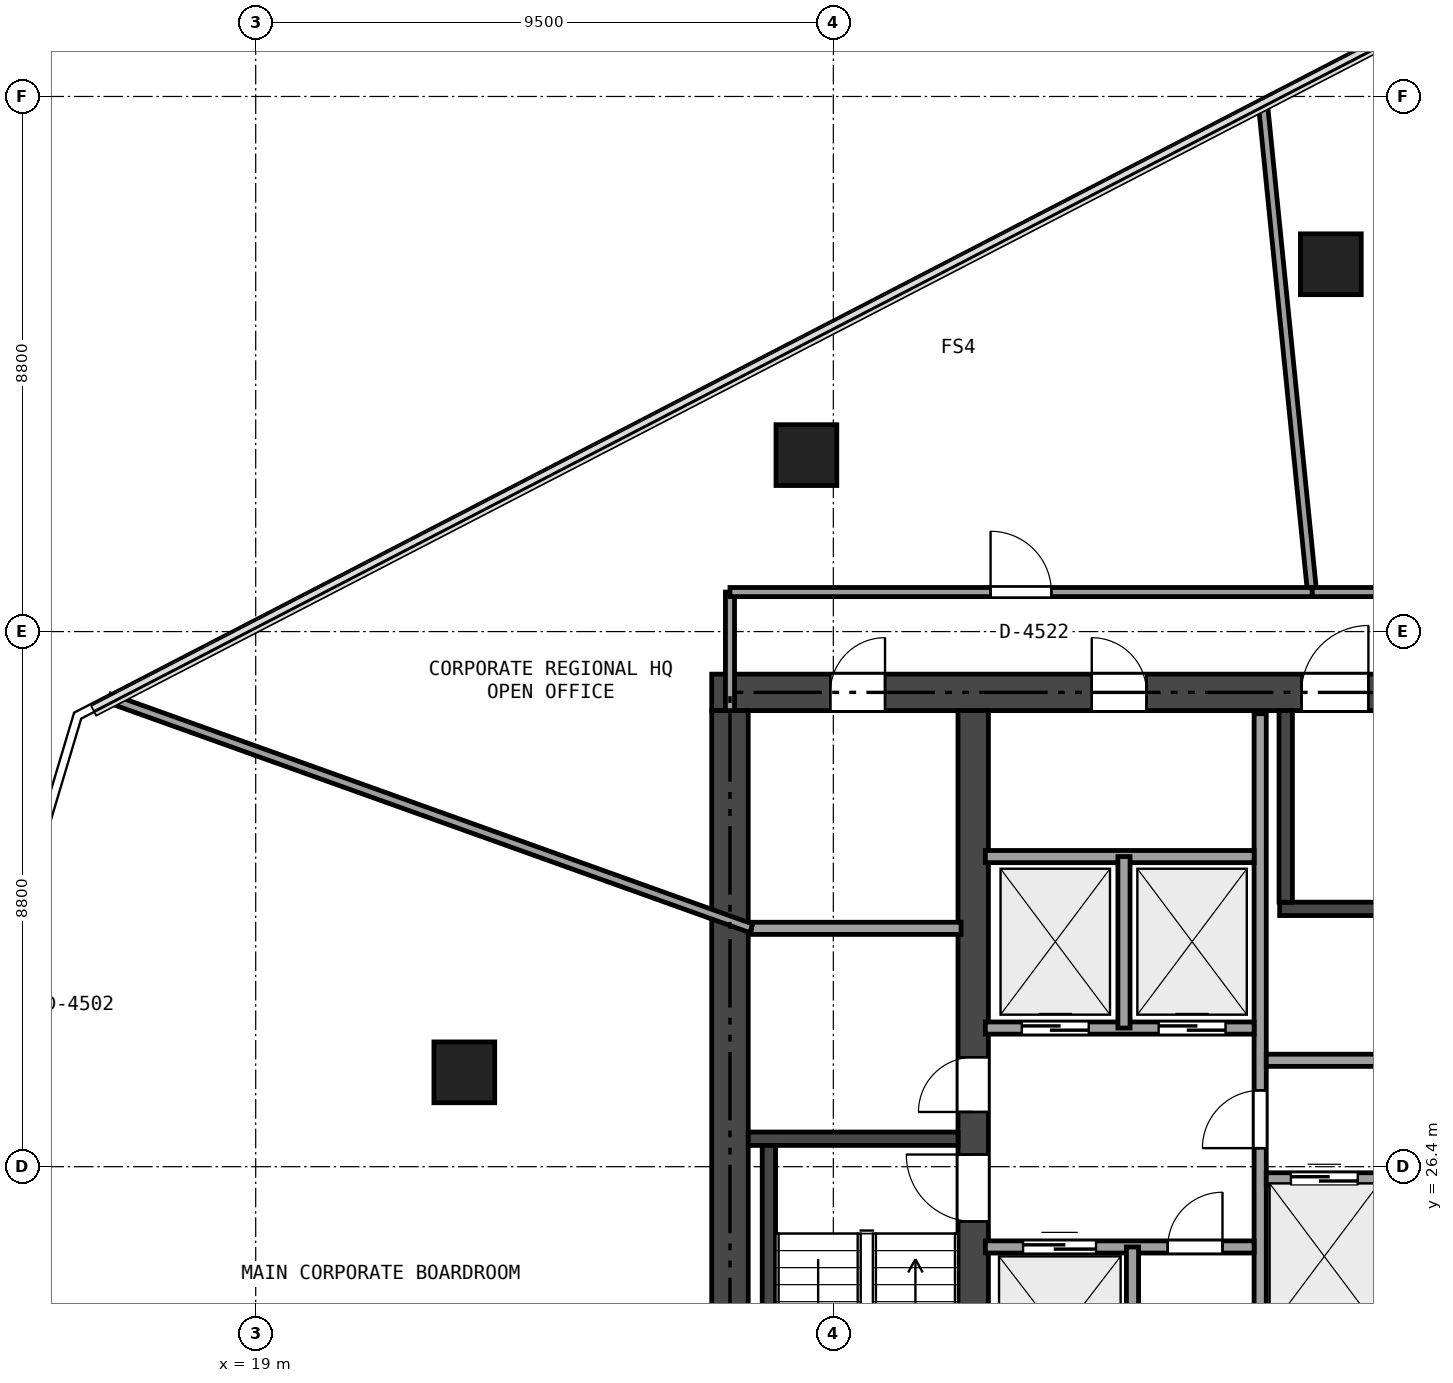
"""IFC4 building model, lengths in metres.
Left out: names, types, materials, properties, quantities, classifications, styles, units other than length and angle.
Written with IfcOpenShell. Run it as: python <this file> out.ifc"""

import sys

from ifc_helpers import new_model, si_unit, direction, frame, frame_2d, origin, origin_2d, place, context, subcontext, project, spatial, rectangle, extrude, element, fill, save


model = new_model("IFC4")
c1 = context("Model", 3, precision=1e-05, world=origin(), true_north=direction((0.0, 1.0)))
c2 = subcontext(c1, "Body", "Model", "MODEL_VIEW")
j1 = project(units=[si_unit("LENGTHUNIT", "METRE"), si_unit("PLANEANGLEUNIT", "RADIAN")], contexts=[c1])
p1 = place(None, origin())
s1 = spatial("IfcSite", under=j1, at=p1, CompositionType="ELEMENT")
p2 = place(p1, origin())
s2 = spatial("IfcBuilding", under=s1, at=p2, CompositionType="ELEMENT")
p3 = place(p2, frame((0.0, 0.0, 168.9)))
s3 = spatial("IfcBuildingStorey", under=s2, at=p3, CompositionType="ELEMENT", Elevation=168.9)
p4 = place(p3, frame((26.5, 34.2, 0.0), z_axis=(0.0, 0.0, 1.0), x_axis=(1.0, 0.0, 0.0)))
e1 = element("IfcWall", 1, at=p4, inside=s3, PredefinedType="SHEAR", context=c2, shape_type="SweptSolid", body=[
    extrude(rectangle(XDim=21.4, YDim=0.6, at=frame_2d((10.7, 0.0))), origin(), (0.0, 0.0, 1.0), 3.24),
])
p5 = place(p4, frame((9.7, 0.0, 0.0)))
e2 = element("IfcOpeningElement", 2, at=p5, cuts=e1, PredefinedType="OPENING", context=c2, shape_type="SweptSolid", body=[
    extrude(rectangle(XDim=1.1, YDim=2.15, at=frame_2d((0.55, 1.075))), frame((0.0, 0.31, 0.0), z_axis=(0.0, -1.0, 0.0), x_axis=(1.0, 0.0, 0.0)), (0.0, 0.0, 1.0), 0.62),
])
p6 = place(p4, frame((1.95, 0.0, 0.0)))
e3 = element("IfcOpeningElement", 3, at=p6, cuts=e1, PredefinedType="OPENING", context=c2, shape_type="SweptSolid", body=[
    extrude(rectangle(XDim=0.9, YDim=2.1, at=frame_2d((0.45, 1.05))), frame((0.0, 0.31, 0.0), z_axis=(0.0, -1.0, 0.0), x_axis=(1.0, 0.0, 0.0)), (0.0, 0.0, 1.0), 0.62),
])
p7 = place(p4, frame((6.25, 0.0, 0.0)))
e4 = element("IfcOpeningElement", 4, at=p7, cuts=e1, PredefinedType="OPENING", context=c2, shape_type="SweptSolid", body=[
    extrude(rectangle(XDim=0.9, YDim=2.1, at=frame_2d((0.45, 1.05))), frame((0.0, 0.31, 0.0), z_axis=(0.0, -1.0, 0.0), x_axis=(1.0, 0.0, 0.0)), (0.0, 0.0, 1.0), 0.62),
])
p8 = place(p3, frame((26.8, 18.9, 0.0), z_axis=(0.0, 0.0, 1.0), x_axis=(0.0, 1.0, 0.0)))
e5 = element("IfcWall", 5, at=p8, inside=s3, PredefinedType="SHEAR", context=c2, shape_type="SweptSolid", body=[
    extrude(rectangle(XDim=15.0, YDim=0.6, at=frame_2d((7.5, 0.0))), origin(), (0.0, 0.0, 1.0), 3.24),
])
p9 = place(p3, frame((30.8, 18.9, 0.0), z_axis=(0.0, 0.0, 1.0), x_axis=(0.0, 1.0, 0.0)))
e6 = element("IfcWall", 6, at=p9, inside=s3, PredefinedType="SHEAR", context=c2, shape_type="SweptSolid", body=[
    extrude(rectangle(XDim=15.0, YDim=0.5, at=frame_2d((7.5, 0.0))), origin(), (0.0, 0.0, 1.0), 3.24),
])
p10 = place(p9, frame((6.6, 0.0, 0.0)))
e7 = element("IfcOpeningElement", 7, at=p10, cuts=e6, PredefinedType="OPENING", context=c2, shape_type="SweptSolid", body=[
    extrude(rectangle(XDim=1.1, YDim=2.15, at=frame_2d((0.55, 1.075))), frame((0.0, 0.26, 0.0), z_axis=(0.0, -1.0, 0.0), x_axis=(1.0, 0.0, 0.0)), (0.0, 0.0, 1.0), 0.52),
])
p11 = place(p9, frame((8.4, 0.0, 0.0)))
e8 = element("IfcOpeningElement", 8, at=p11, cuts=e6, PredefinedType="OPENING", context=c2, shape_type="SweptSolid", body=[
    extrude(rectangle(XDim=0.9, YDim=2.1, at=frame_2d((0.45, 1.05))), frame((0.0, 0.26, 0.0), z_axis=(0.0, -1.0, 0.0), x_axis=(1.0, 0.0, 0.0)), (0.0, 0.0, 1.0), 0.52),
])
p12 = place(p3, frame((27.1, 26.86, 0.0), z_axis=(0.0, 0.0, 1.0), x_axis=(1.0, 0.0, 0.0)))
e9 = element("IfcWall", 9, at=p12, inside=s3, PredefinedType="SHEAR", context=c2, shape_type="SweptSolid", body=[
    extrude(rectangle(XDim=3.45, YDim=0.22, at=frame_2d((1.725, 0.0))), origin(), (0.0, 0.0, 1.0), 3.24),
])
p13 = place(p3, frame((27.44, 19.35, 0.0), z_axis=(0.0, 0.0, 1.0), x_axis=(0.0, 1.0, 0.0)))
e10 = element("IfcWall", 10, at=p13, inside=s3, PredefinedType="SHEAR", context=c2, shape_type="SweptSolid", body=[
    extrude(rectangle(XDim=7.4, YDim=0.22, at=frame_2d((3.7, 0.0))), origin(), (0.0, 0.0, 1.0), 3.24),
])
p14 = place(p3, frame((35.84, 30.64, 0.0), z_axis=(0.0, 0.0, 1.0), x_axis=(1.0, 0.0, 0.0)))
e11 = element("IfcWall", 11, at=p14, inside=s3, PredefinedType="SHEAR", context=c2, shape_type="SweptSolid", body=[
    extrude(rectangle(XDim=7.61, YDim=0.22, at=frame_2d((3.805, 0.0))), origin(), (0.0, 0.0, 1.0), 3.24),
])
p15 = place(p3, frame((35.94, 30.75, 0.0), z_axis=(0.0, 0.0, 1.0), x_axis=(0.0, 1.0, 0.0)))
e12 = element("IfcWall", 12, at=p15, inside=s3, PredefinedType="SHEAR", context=c2, shape_type="SweptSolid", body=[
    extrude(rectangle(XDim=3.15, YDim=0.22, at=frame_2d((1.575, 0.0))), origin(), (0.0, 0.0, 1.0), 3.24),
])
for number, where, z_axis, x_axis in (
    (13, (36.682, 41.241, 0.0), (0.0, 0.0, 1.0), (1.0, 0.0, 0.0)),
    (14, (28.057, 38.102, 0.0), (0.0, 0.0, 1.0), (1.0, 0.0, 0.0)),
    (15, (22.431, 27.952, 0.0), (0.0, 0.0, 1.0), (1.0, 0.0, 0.0)),
):
    element("IfcColumn", number, at=place(p3, frame(where, z_axis=z_axis, x_axis=x_axis)), inside=s3, PredefinedType="COLUMN", context=c2, shape_type="SweptSolid", body=[
        extrude(rectangle(XDim=1.0, YDim=1.0, at=origin_2d()), origin(), (0.0, 0.0, 1.0), 3.24),
    ])
p16 = place(p3, frame((27.15, 30.32, 0.0), z_axis=(0.0, 0.0, 1.0), x_axis=(1.0, 0.0, 0.0)))
e16 = element("IfcWall", 16, at=p16, inside=s3, PredefinedType="SOLIDWALL", context=c2, shape_type="SweptSolid", body=[
    extrude(rectangle(XDim=3.45, YDim=0.2, at=frame_2d((1.725, 0.0))), origin(), (0.0, 0.0, 1.0), 3.24),
])
p17 = place(p3, frame((35.52, 18.95, 0.0), z_axis=(0.0, 0.0, 1.0), x_axis=(0.0, 1.0, 0.0)))
e17 = element("IfcWall", 17, at=p17, inside=s3, PredefinedType="SOLIDWALL", context=c2, shape_type="SweptSolid", body=[
    extrude(rectangle(XDim=14.9, YDim=0.2, at=frame_2d((7.45, 0.0))), origin(), (0.0, 0.0, 1.0), 2.761),
])
p18 = place(p17, frame((7.755, 0.0, 0.0)))
e18 = element("IfcOpeningElement", 18, at=p18, cuts=e17, PredefinedType="OPENING", context=c2, shape_type="SweptSolid", body=[
    extrude(rectangle(XDim=0.95, YDim=2.15, at=frame_2d((0.475, 1.075))), frame((0.0, 0.11, 0.0), z_axis=(0.0, -1.0, 0.0), x_axis=(1.0, 0.0, 0.0)), (0.0, 0.0, 1.0), 0.22),
])
p19 = place(p17, frame((0.6, 0.0, 0.0)))
e19 = element("IfcOpeningElement", 19, at=p19, cuts=e17, PredefinedType="OPENING", context=c2, shape_type="SweptSolid", body=[
    extrude(rectangle(XDim=0.9, YDim=2.1, at=frame_2d((0.45, 1.05))), frame((0.0, 0.11, 0.0), z_axis=(0.0, -1.0, 0.0), x_axis=(1.0, 0.0, 0.0)), (0.0, 0.0, 1.0), 0.22),
])
p20 = place(p3, frame((31.0, 28.68, 0.0), z_axis=(0.0, 0.0, 1.0), x_axis=(1.0, 0.0, 0.0)))
e20 = element("IfcWall", 20, at=p20, inside=s3, PredefinedType="SOLIDWALL", context=c2, shape_type="SweptSolid", body=[
    extrude(rectangle(XDim=4.42, YDim=0.2, at=frame_2d((2.21, 0.0))), origin(), (0.0, 0.0, 1.0), 3.24),
])
p21 = place(p20, frame((0.6, 0.0, 0.0)))
e21 = element("IfcOpeningElement", 21, at=p21, cuts=e20, PredefinedType="OPENING", context=c2, shape_type="SweptSolid", body=[
    extrude(rectangle(XDim=1.1, YDim=2.15, at=frame_2d((0.55, 1.075))), frame((0.0, 0.11, 0.0), z_axis=(0.0, -1.0, 0.0), x_axis=(1.0, 0.0, 0.0)), (0.0, 0.0, 1.0), 0.22),
])
p22 = place(p20, frame((2.85, 0.0, 0.0)))
e22 = element("IfcOpeningElement", 22, at=p22, cuts=e20, PredefinedType="OPENING", context=c2, shape_type="SweptSolid", body=[
    extrude(rectangle(XDim=1.1, YDim=2.15, at=frame_2d((0.55, 1.075))), frame((0.0, 0.11, 0.0), z_axis=(0.0, -1.0, 0.0), x_axis=(1.0, 0.0, 0.0)), (0.0, 0.0, 1.0), 0.22),
])
p23 = place(p3, frame((31.0, 31.5, 0.0), z_axis=(0.0, 0.0, 1.0), x_axis=(1.0, 0.0, 0.0)))
e23 = element("IfcWall", 23, at=p23, inside=s3, PredefinedType="SOLIDWALL", context=c2, shape_type="SweptSolid", body=[
    extrude(rectangle(XDim=4.42, YDim=0.2, at=frame_2d((2.21, 0.0))), origin(), (0.0, 0.0, 1.0), 3.24),
])
p24 = place(p3, frame((33.28, 28.68, 0.0), z_axis=(0.0, 0.0, 1.0), x_axis=(0.0, 1.0, 0.0)))
e24 = element("IfcWall", 24, at=p24, inside=s3, PredefinedType="SOLIDWALL", context=c2, shape_type="SweptSolid", body=[
    extrude(rectangle(XDim=2.82, YDim=0.2, at=frame_2d((1.41, 0.0))), origin(), (0.0, 0.0, 1.0), 3.24),
])
p25 = place(p3, frame((31.0, 25.08, 0.0), z_axis=(0.0, 0.0, 1.0), x_axis=(1.0, 0.0, 0.0)))
e25 = element("IfcWall", 25, at=p25, inside=s3, PredefinedType="SOLIDWALL", context=c2, shape_type="SweptSolid", body=[
    extrude(rectangle(XDim=4.42, YDim=0.2, at=frame_2d((2.21, 0.0))), origin(), (0.0, 0.0, 1.0), 3.24),
])
p26 = place(p25, frame((3.0, 0.0, 0.0)))
e26 = element("IfcOpeningElement", 26, at=p26, cuts=e25, PredefinedType="OPENING", context=c2, shape_type="SweptSolid", body=[
    extrude(rectangle(XDim=0.9, YDim=2.1, at=frame_2d((0.45, 1.05))), frame((0.0, 0.11, 0.0), z_axis=(0.0, -1.0, 0.0), x_axis=(1.0, 0.0, 0.0)), (0.0, 0.0, 1.0), 0.22),
])
p27 = place(p25, frame((0.62, 0.0, 0.0)))
e27 = element("IfcOpeningElement", 27, at=p27, cuts=e25, PredefinedType="OPENING", context=c2, shape_type="SweptSolid", body=[
    extrude(rectangle(XDim=1.2, YDim=2.15, at=frame_2d((0.6, 1.075))), frame((0.0, 0.11, 0.0), z_axis=(0.0, -1.0, 0.0), x_axis=(1.0, 0.0, 0.0)), (0.0, 0.0, 1.0), 0.22),
])
p28 = place(p3, frame((33.42, 18.95, 0.0), z_axis=(0.0, 0.0, 1.0), x_axis=(0.0, 1.0, 0.0)))
e28 = element("IfcWall", 28, at=p28, inside=s3, PredefinedType="SOLIDWALL", context=c2, shape_type="SweptSolid", body=[
    extrude(rectangle(XDim=6.13, YDim=0.2, at=frame_2d((3.065, 0.0))), origin(), (0.0, 0.0, 1.0), 2.761),
])
p29 = place(p3, frame((35.62, 28.15, 0.0), z_axis=(0.0, 0.0, 1.0), x_axis=(1.0, 0.0, 0.0)))
e29 = element("IfcWall", 29, at=p29, inside=s3, PredefinedType="SOLIDWALL", context=c2, shape_type="SweptSolid", body=[
    extrude(rectangle(XDim=7.88, YDim=0.2, at=frame_2d((3.94, 0.0))), origin(), (0.0, 0.0, 1.0), 3.24),
])
p30 = place(p3, frame((35.62, 26.2, 0.0), z_axis=(0.0, 0.0, 1.0), x_axis=(1.0, 0.0, 0.0)))
e30 = element("IfcWall", 30, at=p30, inside=s3, PredefinedType="SOLIDWALL", context=c2, shape_type="SweptSolid", body=[
    extrude(rectangle(XDim=7.88, YDim=0.2, at=frame_2d((3.94, 0.0))), origin(), (0.0, 0.0, 1.0), 3.24),
])
p31 = place(p30, frame((0.405, 0.0, 0.0)))
e31 = element("IfcOpeningElement", 31, at=p31, cuts=e30, PredefinedType="OPENING", context=c2, shape_type="SweptSolid", body=[
    extrude(rectangle(XDim=1.1, YDim=2.15, at=frame_2d((0.55, 1.075))), frame((0.0, 0.11, 0.0), z_axis=(0.0, -1.0, 0.0), x_axis=(1.0, 0.0, 0.0)), (0.0, 0.0, 1.0), 0.22),
])
p32 = place(p30, frame((2.355, 0.0, 0.0)))
e32 = element("IfcOpeningElement", 32, at=p32, cuts=e30, PredefinedType="OPENING", context=c2, shape_type="SweptSolid", body=[
    extrude(rectangle(XDim=1.1, YDim=2.15, at=frame_2d((0.55, 1.075))), frame((0.0, 0.11, 0.0), z_axis=(0.0, -1.0, 0.0), x_axis=(1.0, 0.0, 0.0)), (0.0, 0.0, 1.0), 0.22),
])
p33 = place(p30, frame((4.305, 0.0, 0.0)))
e33 = element("IfcOpeningElement", 33, at=p33, cuts=e30, PredefinedType="OPENING", context=c2, shape_type="SweptSolid", body=[
    extrude(rectangle(XDim=1.1, YDim=2.15, at=frame_2d((0.55, 1.075))), frame((0.0, 0.11, 0.0), z_axis=(0.0, -1.0, 0.0), x_axis=(1.0, 0.0, 0.0)), (0.0, 0.0, 1.0), 0.22),
])
p34 = place(p30, frame((6.255, 0.0, 0.0)))
e34 = element("IfcOpeningElement", 34, at=p34, cuts=e30, PredefinedType="OPENING", context=c2, shape_type="SweptSolid", body=[
    extrude(rectangle(XDim=1.1, YDim=2.15, at=frame_2d((0.55, 1.075))), frame((0.0, 0.11, 0.0), z_axis=(0.0, -1.0, 0.0), x_axis=(1.0, 0.0, 0.0)), (0.0, 0.0, 1.0), 0.22),
])
p35 = place(p3, frame((35.563, 43.898, 0.0), z_axis=(0.0, 0.0, 1.0), x_axis=(0.100149208892, -0.994972429748, 0.0)))
e35 = element("IfcWall", 35, at=p35, inside=s3, PredefinedType="PARTITIONING", context=c2, shape_type="SweptSolid", body=[
    extrude(rectangle(XDim=8.089, YDim=0.15, at=frame_2d((4.044, 0.0))), origin(), (0.0, 0.0, 1.0), 2.725),
])
p36 = place(p3, frame((36.373, 35.85, 0.0), z_axis=(0.0, 0.0, 1.0), x_axis=(1.0, 0.0, 0.0)))
e36 = element("IfcWall", 36, at=p36, inside=s3, PredefinedType="PARTITIONING", context=c2, shape_type="SweptSolid", body=[
    extrude(rectangle(XDim=1.757, YDim=0.15, at=frame_2d((0.878, 0.0))), origin(), (0.0, 0.0, 1.0), 2.607),
])
p37 = place(p3, frame((16.595, 34.101, 0.0), z_axis=(0.0, 0.0, 1.0), x_axis=(0.941419775025, -0.337237019309, 0.0)))
e37 = element("IfcWall", 37, at=p37, inside=s3, PredefinedType="PARTITIONING", context=c2, shape_type="SweptSolid", body=[
    extrude(rectangle(XDim=11.212, YDim=0.15, at=frame_2d((5.606, 0.0))), origin(), (0.0, 0.0, 1.0), 2.725),
])
p38 = place(p3, frame((26.8, 33.9, 0.0), z_axis=(0.0, 0.0, 1.0), x_axis=(0.0, 1.0, 0.0)))
e38 = element("IfcWall", 38, at=p38, inside=s3, PredefinedType="PARTITIONING", context=c2, shape_type="SweptSolid", body=[
    extrude(rectangle(XDim=1.95, YDim=0.15, at=frame_2d((0.975, 0.0))), origin(), (0.0, 0.0, 1.0), 2.725),
])
p39 = place(p3, frame((26.8, 35.85, 0.0), z_axis=(0.0, 0.0, 1.0), x_axis=(1.0, 0.0, 0.0)))
e39 = element("IfcWall", 39, at=p39, inside=s3, PredefinedType="PARTITIONING", context=c2, shape_type="SweptSolid", body=[
    extrude(rectangle(XDim=9.573, YDim=0.15, at=frame_2d((4.787, 0.0))), origin(), (0.0, 0.0, 1.0), 2.607),
])
p40 = place(p39, frame((4.286, 0.0, 0.0)))
e40 = element("IfcOpeningElement", 40, at=p40, cuts=e39, PredefinedType="OPENING", context=c2, shape_type="SweptSolid", body=[
    extrude(rectangle(XDim=1.0, YDim=2.15, at=frame_2d((0.5, 1.075))), frame((0.0, 0.085, 0.0), z_axis=(0.0, -1.0, 0.0), x_axis=(1.0, 0.0, 0.0)), (0.0, 0.0, 1.0), 0.17),
])
p41 = place(p10, origin())
e41 = element("IfcDoor", 41, at=p41, inside=s3, OperationType="SINGLE_SWING_RIGHT", PredefinedType="DOOR", context=c2, shape_type="SweptSolid", body=[
    extrude(rectangle(XDim=1.1, YDim=2.15, at=frame_2d((0.55, 1.075))), frame((0.0, 0.025, 0.0), z_axis=(0.0, -1.0, 0.0), x_axis=(1.0, 0.0, 0.0)), (0.0, 0.0, 1.0), 0.05),
])
fill(e7, e41)
p42 = place(p5, origin())
e42 = element("IfcDoor", 42, at=p42, inside=s3, OperationType="SINGLE_SWING_RIGHT", PredefinedType="DOOR", context=c2, shape_type="SweptSolid", body=[
    extrude(rectangle(XDim=1.1, YDim=2.15, at=frame_2d((0.55, 1.075))), frame((0.0, 0.025, 0.0), z_axis=(0.0, -1.0, 0.0), x_axis=(1.0, 0.0, 0.0)), (0.0, 0.0, 1.0), 0.05),
])
fill(e2, e42)
p43 = place(p18, origin())
e43 = element("IfcDoor", 43, at=p43, inside=s3, OperationType="SINGLE_SWING_LEFT", PredefinedType="DOOR", context=c2, shape_type="SweptSolid", body=[
    extrude(rectangle(XDim=0.95, YDim=2.15, at=frame_2d((0.475, 1.075))), frame((0.0, 0.025, 0.0), z_axis=(0.0, -1.0, 0.0), x_axis=(1.0, 0.0, 0.0)), (0.0, 0.0, 1.0), 0.05),
])
fill(e18, e43)
p44 = place(p11, origin())
e44 = element("IfcDoor", 44, at=p44, inside=s3, OperationType="SINGLE_SWING_LEFT", PredefinedType="DOOR", context=c2, shape_type="SweptSolid", body=[
    extrude(rectangle(XDim=0.9, YDim=2.1, at=frame_2d((0.45, 1.05))), frame((0.0, 0.025, 0.0), z_axis=(0.0, -1.0, 0.0), x_axis=(1.0, 0.0, 0.0)), (0.0, 0.0, 1.0), 0.05),
])
fill(e8, e44)
p45 = place(p6, origin())
e45 = element("IfcDoor", 45, at=p45, inside=s3, OperationType="SINGLE_SWING_RIGHT", PredefinedType="DOOR", context=c2, shape_type="SweptSolid", body=[
    extrude(rectangle(XDim=0.9, YDim=2.1, at=frame_2d((0.45, 1.05))), frame((0.0, 0.025, 0.0), z_axis=(0.0, -1.0, 0.0), x_axis=(1.0, 0.0, 0.0)), (0.0, 0.0, 1.0), 0.05),
])
fill(e3, e45)
p46 = place(p7, origin())
e46 = element("IfcDoor", 46, at=p46, inside=s3, OperationType="SINGLE_SWING_LEFT", PredefinedType="DOOR", context=c2, shape_type="SweptSolid", body=[
    extrude(rectangle(XDim=0.9, YDim=2.1, at=frame_2d((0.45, 1.05))), frame((0.0, 0.025, 0.0), z_axis=(0.0, -1.0, 0.0), x_axis=(1.0, 0.0, 0.0)), (0.0, 0.0, 1.0), 0.05),
])
fill(e4, e46)
p47 = place(p26, origin())
e47 = element("IfcDoor", 47, at=p47, inside=s3, OperationType="SINGLE_SWING_RIGHT", PredefinedType="DOOR", context=c2, shape_type="SweptSolid", body=[
    extrude(rectangle(XDim=0.9, YDim=2.1, at=frame_2d((0.45, 1.05))), frame((0.0, 0.025, 0.0), z_axis=(0.0, -1.0, 0.0), x_axis=(1.0, 0.0, 0.0)), (0.0, 0.0, 1.0), 0.05),
])
fill(e26, e47)
p48 = place(p21, origin())
e48 = element("IfcDoor", 48, at=p48, inside=s3, OperationType="SLIDING_TO_LEFT", PredefinedType="DOOR", context=c2, shape_type="SweptSolid", body=[
    extrude(rectangle(XDim=1.1, YDim=2.15, at=frame_2d((0.55, 1.075))), frame((0.0, 0.025, 0.0), z_axis=(0.0, -1.0, 0.0), x_axis=(1.0, 0.0, 0.0)), (0.0, 0.0, 1.0), 0.05),
])
fill(e21, e48)
p49 = place(p22, origin())
e49 = element("IfcDoor", 49, at=p49, inside=s3, OperationType="SLIDING_TO_LEFT", PredefinedType="DOOR", context=c2, shape_type="SweptSolid", body=[
    extrude(rectangle(XDim=1.1, YDim=2.15, at=frame_2d((0.55, 1.075))), frame((0.0, 0.025, 0.0), z_axis=(0.0, -1.0, 0.0), x_axis=(1.0, 0.0, 0.0)), (0.0, 0.0, 1.0), 0.05),
])
fill(e22, e49)
p50 = place(p27, origin())
e50 = element("IfcDoor", 50, at=p50, inside=s3, OperationType="SLIDING_TO_LEFT", PredefinedType="DOOR", context=c2, shape_type="SweptSolid", body=[
    extrude(rectangle(XDim=1.2, YDim=2.15, at=frame_2d((0.6, 1.075))), frame((0.0, 0.025, 0.0), z_axis=(0.0, -1.0, 0.0), x_axis=(1.0, 0.0, 0.0)), (0.0, 0.0, 1.0), 0.05),
])
fill(e27, e50)
p51 = place(p31, origin())
e51 = element("IfcDoor", 51, at=p51, inside=s3, OperationType="SLIDING_TO_LEFT", PredefinedType="DOOR", context=c2, shape_type="SweptSolid", body=[
    extrude(rectangle(XDim=1.1, YDim=2.15, at=frame_2d((0.55, 1.075))), frame((0.0, 0.025, 0.0), z_axis=(0.0, -1.0, 0.0), x_axis=(1.0, 0.0, 0.0)), (0.0, 0.0, 1.0), 0.05),
])
fill(e31, e51)
p52 = place(p40, origin())
e52 = element("IfcDoor", 52, at=p52, inside=s3, OperationType="SINGLE_SWING_LEFT", PredefinedType="DOOR", context=c2, shape_type="SweptSolid", body=[
    extrude(rectangle(XDim=1.0, YDim=2.15, at=frame_2d((0.5, 1.075))), frame((0.0, 0.025, 0.0), z_axis=(0.0, -1.0, 0.0), x_axis=(1.0, 0.0, 0.0)), (0.0, 0.0, 1.0), 0.05),
])
fill(e40, e52)
save(model, sys.argv[1])
